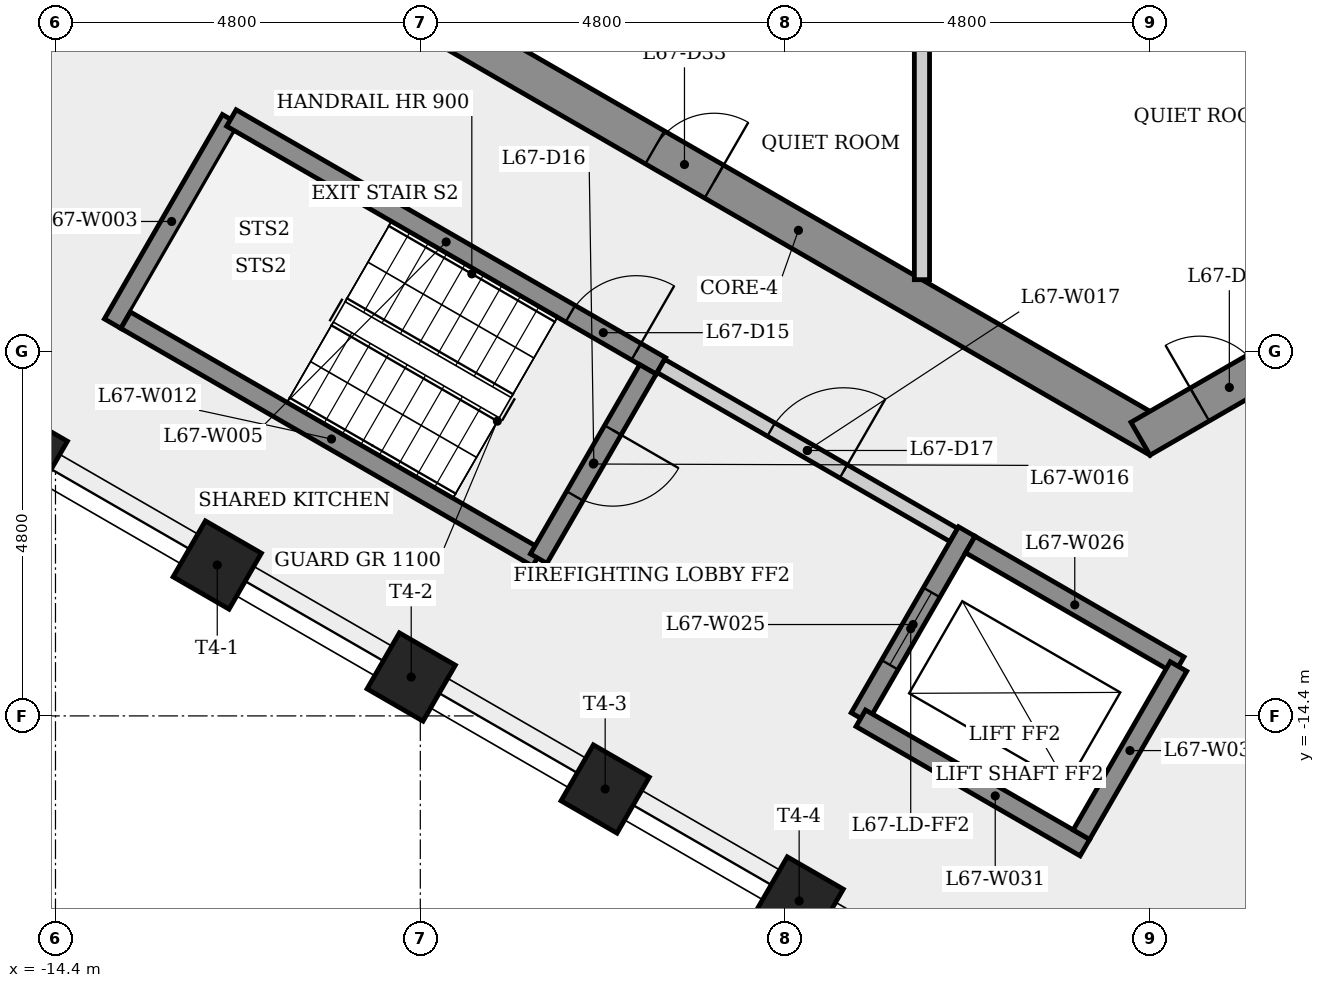
"""IFC4 building model, lengths in metres.
Left out: names, types, materials, properties, quantities, classifications, styles, units other than length and angle.
Written with IfcOpenShell. Run it as: python <this file> out.ifc"""

import sys

from ifc_helpers import new_model, si_unit, direction, frame, frame_2d, origin, origin_2d, place, context, subcontext, project, spatial, rectangle, extrude, element, fill, save


model = new_model("IFC4")
c1 = context("Model", 3, precision=1e-05, world=origin(), true_north=direction((0.0, 1.0)))
c2 = subcontext(c1, "Body", "Model", "MODEL_VIEW")
j1 = project(units=[si_unit("LENGTHUNIT", "METRE"), si_unit("PLANEANGLEUNIT", "RADIAN")], contexts=[c1])
p1 = place(None, origin())
s1 = spatial("IfcSite", under=j1, at=p1, CompositionType="ELEMENT")
p2 = place(p1, origin())
s2 = spatial("IfcBuilding", under=s1, at=p2, CompositionType="ELEMENT")
p3 = place(p2, frame((0.0, 0.0, 249.5)))
s3 = spatial("IfcBuildingStorey", under=s2, at=p3, CompositionType="ELEMENT", Elevation=249.5)
p4 = place(p3, frame((-9.375, -5.268, 0.0), z_axis=(0.0, 0.0, 1.0), x_axis=(0.866023993627, -0.500002442456, 0.0)))
e1 = element("IfcWall", 1, at=p4, inside=s3, PredefinedType="SHEAR", context=c2, shape_type="SweptSolid", body=[
    extrude(rectangle(XDim=10.97, YDim=0.5, at=frame_2d((5.485, 0.0))), origin(), (0.0, 0.0, 1.0), 3.4),
])
p5 = place(p4, frame((3.303, 0.0, 0.0)))
e2 = element("IfcOpeningElement", 2, at=p5, cuts=e1, PredefinedType="OPENING", context=c2, shape_type="SweptSolid", body=[
    extrude(rectangle(XDim=0.9, YDim=2.1, at=frame_2d((0.45, 1.05))), frame((0.0, 0.26, 0.0), z_axis=(0.0, -1.0, 0.0), x_axis=(1.0, 0.0, 0.0)), (0.0, 0.0, 1.0), 0.52),
])
p6 = place(p3, frame((-0.125, -10.753, 0.0), z_axis=(0.0, 0.0, 1.0), x_axis=(0.866023993627, 0.500002442456, 0.0)))
e3 = element("IfcWall", 3, at=p6, inside=s3, PredefinedType="SHEAR", context=c2, shape_type="SweptSolid", body=[
    extrude(rectangle(XDim=10.97, YDim=0.5, at=frame_2d((5.485, 0.0))), origin(), (0.0, 0.0, 1.0), 3.4),
])
p7 = place(p6, frame((0.9, 0.0, 0.0)))
e4 = element("IfcOpeningElement", 4, at=p7, cuts=e3, PredefinedType="OPENING", context=c2, shape_type="SweptSolid", body=[
    extrude(rectangle(XDim=0.9, YDim=2.1, at=frame_2d((0.45, 1.05))), frame((0.0, 0.26, 0.0), z_axis=(0.0, -1.0, 0.0), x_axis=(1.0, 0.0, 0.0)), (0.0, 0.0, 1.0), 0.52),
])
p8 = place(p6, frame((9.17, 0.0, 0.0)))
e5 = element("IfcOpeningElement", 5, at=p8, cuts=e3, PredefinedType="OPENING", context=c2, shape_type="SweptSolid", body=[
    extrude(rectangle(XDim=0.9, YDim=2.1, at=frame_2d((0.45, 1.05))), frame((0.0, 0.26, 0.0), z_axis=(0.0, -1.0, 0.0), x_axis=(1.0, 0.0, 0.0)), (0.0, 0.0, 1.0), 0.52),
])
for number, where, z_axis, x_axis in (
    (6, (-14.824, -10.942, 0.0), (0.0, 0.0, 1.0), (-0.5, -0.866, 0.0)),
    (7, (-12.272, -12.415, 0.0), (0.0, 0.0, 1.0), (-0.5, -0.866, 0.0)),
    (8, (-9.72, -13.888, 0.0), (0.0, 0.0, 1.0), (-0.5, -0.866, 0.0)),
    (9, (-7.168, -15.362, 0.0), (0.0, 0.0, 1.0), (-0.5, -0.866, 0.0)),
    (10, (-4.616, -16.835, 0.0), (0.0, 0.0, 1.0), (-0.5, -0.866, 0.0)),
):
    element("IfcColumn", number, at=place(p3, frame(where, z_axis=z_axis, x_axis=x_axis)), inside=s3, PredefinedType="COLUMN", context=c2, shape_type="SweptSolid", body=[
        extrude(rectangle(XDim=0.85, YDim=0.85, at=origin_2d()), origin(), (0.0, 0.0, 1.0), 3.4),
    ])
p9 = place(p3, frame((-13.648, -9.239, 0.0), z_axis=(0.0, 0.0, 1.0), x_axis=(0.500003782172, 0.866023220135, 0.0)))
e11 = element("IfcWall", 11, at=p9, inside=s3, PredefinedType="SHEAR", context=c2, shape_type="SweptSolid", body=[
    extrude(rectangle(XDim=3.105, YDim=0.25, at=frame_2d((1.552, 0.0))), origin(), (0.0, 0.0, 1.0), 3.0),
])
p10 = place(p3, frame((-12.085, -6.532, 0.0), z_axis=(0.0, 0.0, 1.0), x_axis=(0.866031063448, -0.499990197047, 0.0)))
e12 = element("IfcWall", 12, at=p10, inside=s3, PredefinedType="SHEAR", context=c2, shape_type="SweptSolid", body=[
    extrude(rectangle(XDim=6.525, YDim=0.25, at=frame_2d((3.263, 0.0))), origin(), (0.0, 0.0, 1.0), 3.0),
])
p11 = place(p10, frame((5.15, 0.0, 0.0)))
e13 = element("IfcOpeningElement", 13, at=p11, cuts=e12, PredefinedType="OPENING", context=c2, shape_type="SweptSolid", body=[
    extrude(rectangle(XDim=1.0, YDim=2.1, at=frame_2d((0.5, 1.05))), frame((0.0, 0.135, 0.0), z_axis=(0.0, -1.0, 0.0), x_axis=(1.0, 0.0, 0.0)), (0.0, 0.0, 1.0), 0.27),
])
p12 = place(p3, frame((-8.06, -12.321, 0.0), z_axis=(0.0, 0.0, 1.0), x_axis=(-0.866029591389, 0.499992746786, 0.0)))
e14 = element("IfcWall", 14, at=p12, inside=s3, PredefinedType="SHEAR", context=c2, shape_type="SweptSolid", body=[
    extrude(rectangle(XDim=6.255, YDim=0.25, at=frame_2d((3.127, 0.0))), origin(), (0.0, 0.0, 1.0), 3.0),
])
p13 = place(p3, frame((-6.605, -9.841, 0.0), z_axis=(0.0, 0.0, 1.0), x_axis=(-0.500011588718, -0.866018712932, 0.0)))
e15 = element("IfcWall", 15, at=p13, inside=s3, PredefinedType="SHEAR", context=c2, shape_type="SweptSolid", body=[
    extrude(rectangle(XDim=2.875, YDim=0.25, at=frame_2d((1.438, 0.0))), origin(), (0.0, 0.0, 1.0), 3.0),
])
p14 = place(p13, frame((0.923, 0.0, 0.0)))
e16 = element("IfcOpeningElement", 16, at=p14, cuts=e15, PredefinedType="OPENING", context=c2, shape_type="SweptSolid", body=[
    extrude(rectangle(XDim=1.0, YDim=2.1, at=frame_2d((0.5, 1.05))), frame((0.0, 0.135, 0.0), z_axis=(0.0, -1.0, 0.0), x_axis=(1.0, 0.0, 0.0)), (0.0, 0.0, 1.0), 0.27),
])
p15 = place(p3, frame((-6.435, -9.795, 0.0), z_axis=(0.0, 0.0, 1.0), x_axis=(0.866012907634, -0.500021643343, 0.0)))
e17 = element("IfcWall", 17, at=p15, inside=s3, PredefinedType="PARTITIONING", context=c2, shape_type="SweptSolid", body=[
    extrude(rectangle(XDim=4.45, YDim=0.2, at=frame_2d((2.225, 0.0))), origin(), (0.0, 0.0, 1.0), 3.0),
])
p16 = place(p15, frame((1.675, 0.0, 0.0)))
e18 = element("IfcOpeningElement", 18, at=p16, cuts=e17, PredefinedType="OPENING", context=c2, shape_type="SweptSolid", body=[
    extrude(rectangle(XDim=1.1, YDim=2.1, at=frame_2d((0.55, 1.05))), frame((0.0, 0.11, 0.0), z_axis=(0.0, -1.0, 0.0), x_axis=(1.0, 0.0, 0.0)), (0.0, 0.0, 1.0), 0.22),
])
p17 = place(p3, frame((-3.0, -5.25, 0.0), z_axis=(0.0, 0.0, 1.0), x_axis=(0.0, -1.0, 0.0)))
e19 = element("IfcWall", 19, at=p17, inside=s3, PredefinedType="PARTITIONING", context=c2, shape_type="SweptSolid", body=[
    extrude(rectangle(XDim=3.41, YDim=0.2, at=frame_2d((1.705, 0.0))), origin(), (0.0, 0.0, 1.0), 3.0),
])
p18 = place(p3, frame((-2.41, -11.974, 0.0), z_axis=(0.0, 0.0, 1.0), x_axis=(-0.49998675294, -0.866033051843, 0.0)))
e20 = element("IfcWall", 20, at=p18, inside=s3, PredefinedType="SHEAR", context=c2, shape_type="SweptSolid", body=[
    extrude(rectangle(XDim=2.825, YDim=0.25, at=frame_2d((1.413, 0.0))), origin(), (0.0, 0.0, 1.0), 3.0),
])
p19 = place(p18, frame((0.926, 0.0, 0.0)))
e21 = element("IfcOpeningElement", 21, at=p19, cuts=e20, PredefinedType="OPENING", context=c2, shape_type="SweptSolid", body=[
    extrude(rectangle(XDim=1.1, YDim=2.1, at=frame_2d((0.55, 1.05))), frame((0.0, 0.135, 0.0), z_axis=(0.0, -1.0, 0.0), x_axis=(1.0, 0.0, 0.0)), (0.0, 0.0, 1.0), 0.27),
])
p20 = place(p3, frame((-2.364, -12.145, 0.0), z_axis=(0.0, 0.0, 1.0), x_axis=(0.866048579423, -0.499959856469, 0.0)))
e22 = element("IfcWall", 22, at=p20, inside=s3, PredefinedType="SHEAR", context=c2, shape_type="SweptSolid", body=[
    extrude(rectangle(XDim=3.175, YDim=0.25, at=frame_2d((1.587, 0.0))), origin(), (0.0, 0.0, 1.0), 3.4),
])
p21 = place(p3, frame((-0.856, -16.133, 0.0), z_axis=(0.0, 0.0, 1.0), x_axis=(-0.866032748241, 0.499987278812, 0.0)))
e23 = element("IfcWall", 23, at=p21, inside=s3, PredefinedType="SHEAR", context=c2, shape_type="SweptSolid", body=[
    extrude(rectangle(XDim=3.405, YDim=0.25, at=frame_2d((1.702, 0.0))), origin(), (0.0, 0.0, 1.0), 3.0),
])
p22 = place(p3, frame((0.375, -13.75, 0.0), z_axis=(0.0, 0.0, 1.0), x_axis=(-0.50003400563, -0.866005769735, 0.0)))
e24 = element("IfcWall", 24, at=p22, inside=s3, PredefinedType="SHEAR", context=c2, shape_type="SweptSolid", body=[
    extrude(rectangle(XDim=2.555, YDim=0.25, at=frame_2d((1.277, 0.0))), origin(), (0.0, 0.0, 1.0), 3.4),
])
p23 = place(p11, origin())
e25 = element("IfcDoor", 25, at=p23, inside=s3, OperationType="SINGLE_SWING_RIGHT", PredefinedType="DOOR", context=c2, shape_type="SweptSolid", body=[
    extrude(rectangle(XDim=1.0, YDim=2.1, at=frame_2d((0.5, 1.05))), frame((0.0, 0.025, 0.0), z_axis=(0.0, -1.0, 0.0), x_axis=(1.0, 0.0, 0.0)), (0.0, 0.0, 1.0), 0.05),
])
fill(e13, e25)
p24 = place(p14, origin())
e26 = element("IfcDoor", 26, at=p24, inside=s3, OperationType="SINGLE_SWING_LEFT", PredefinedType="DOOR", context=c2, shape_type="SweptSolid", body=[
    extrude(rectangle(XDim=1.0, YDim=2.1, at=frame_2d((0.5, 1.05))), frame((0.0, 0.025, 0.0), z_axis=(0.0, -1.0, 0.0), x_axis=(1.0, 0.0, 0.0)), (0.0, 0.0, 1.0), 0.05),
])
fill(e16, e26)
p25 = place(p16, origin())
e27 = element("IfcDoor", 27, at=p25, inside=s3, OperationType="SINGLE_SWING_RIGHT", PredefinedType="DOOR", context=c2, shape_type="SweptSolid", body=[
    extrude(rectangle(XDim=1.1, YDim=2.1, at=frame_2d((0.55, 1.05))), frame((0.0, 0.025, 0.0), z_axis=(0.0, -1.0, 0.0), x_axis=(1.0, 0.0, 0.0)), (0.0, 0.0, 1.0), 0.05),
])
fill(e18, e27)
p26 = place(p19, origin())
e28 = element("IfcDoor", 28, at=p26, inside=s3, OperationType="SLIDING_TO_LEFT", PredefinedType="DOOR", context=c2, shape_type="SweptSolid", body=[
    extrude(rectangle(XDim=1.1, YDim=2.1, at=frame_2d((0.55, 1.05))), frame((0.0, 0.025, 0.0), z_axis=(0.0, -1.0, 0.0), x_axis=(1.0, 0.0, 0.0)), (0.0, 0.0, 1.0), 0.05),
])
fill(e21, e28)
p27 = place(p5, origin())
e29 = element("IfcDoor", 29, at=p27, inside=s3, OperationType="SINGLE_SWING_RIGHT", PredefinedType="DOOR", context=c2, shape_type="SweptSolid", body=[
    extrude(rectangle(XDim=0.9, YDim=2.1, at=frame_2d((0.45, 1.05))), frame((0.0, 0.025, 0.0), z_axis=(0.0, -1.0, 0.0), x_axis=(1.0, 0.0, 0.0)), (0.0, 0.0, 1.0), 0.05),
])
fill(e2, e29)
p28 = place(p7, origin())
e30 = element("IfcDoor", 30, at=p28, inside=s3, OperationType="SINGLE_SWING_LEFT", PredefinedType="DOOR", context=c2, shape_type="SweptSolid", body=[
    extrude(rectangle(XDim=0.9, YDim=2.1, at=frame_2d((0.45, 1.05))), frame((0.0, 0.025, 0.0), z_axis=(0.0, -1.0, 0.0), x_axis=(1.0, 0.0, 0.0)), (0.0, 0.0, 1.0), 0.05),
])
fill(e4, e30)
save(model, sys.argv[1])
